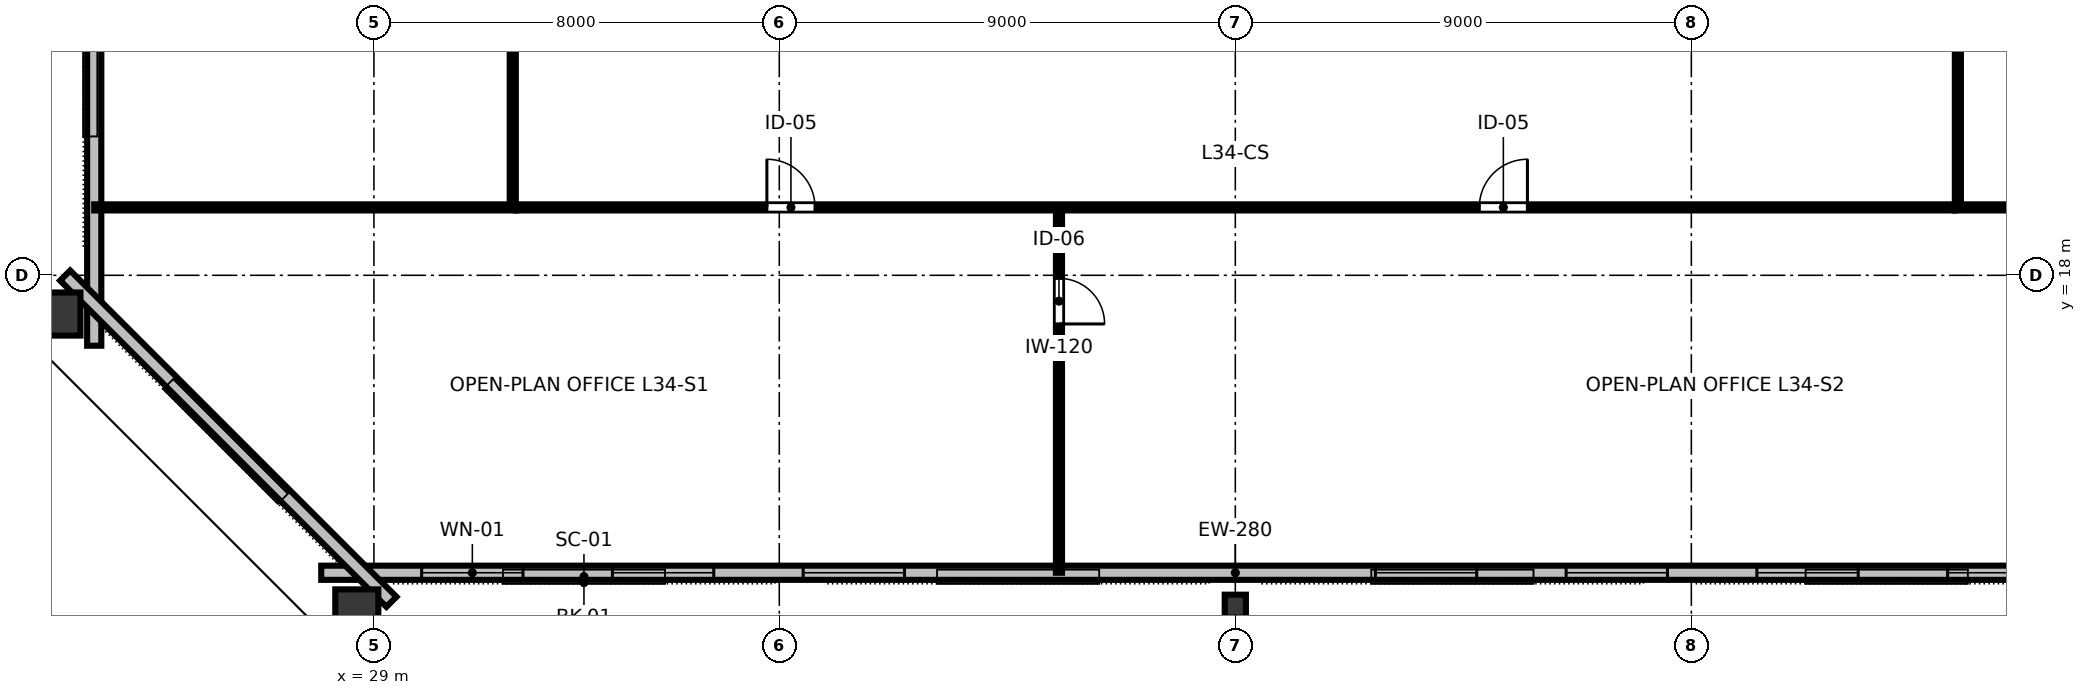
"""IFC4 building model, lengths in metres.
Left out: names, types, materials, properties, quantities, classifications, styles, units other than length and angle.
Written with IfcOpenShell. Run it as: python <this file> out.ifc"""

import sys

from ifc_helpers import new_model, si_unit, direction, frame, frame_2d, origin, origin_2d, place, context, subcontext, project, spatial, rectangle, hollow_rectangle, i_section, extrude, element, fill, save


model = new_model("IFC4")
c1 = context("Model", 3, precision=1e-05, world=origin(), true_north=direction((0.0, 1.0)))
c2 = subcontext(c1, "Body", "Model", "MODEL_VIEW")
j1 = project(units=[si_unit("LENGTHUNIT", "METRE"), si_unit("PLANEANGLEUNIT", "RADIAN")], contexts=[c1])
p1 = place(None, origin())
s1 = spatial("IfcSite", under=j1, at=p1, CompositionType="ELEMENT")
p2 = place(p1, origin())
s2 = spatial("IfcBuilding", under=s1, at=p2, CompositionType="ELEMENT")
p3 = place(p2, frame((0.0, 0.0, 131.2)))
s3 = spatial("IfcBuildingStorey", under=s2, at=p3, CompositionType="ELEMENT", Elevation=131.2)
p4 = place(p3, frame((28.662, 11.302, 0.0), z_axis=(0.0, 0.0, 1.0), x_axis=(1.0, 0.0, 0.0)))
e1 = element("IfcColumn", 1, at=p4, inside=s3, PredefinedType="COLUMN", context=c2, shape_type="SweptSolid", body=[
    extrude(hollow_rectangle(XDim=0.85, YDim=1.0, WallThickness=0.05, at=origin_2d()), origin(), (0.0, 0.0, 1.0), 3.358),
])
p5 = place(p3, frame((46.0, 11.47, 0.0), z_axis=(0.0, 0.0, 1.0), x_axis=(1.0, 0.0, 0.0)))
e2 = element("IfcColumn", 2, at=p5, inside=s3, PredefinedType="COLUMN", context=c2, shape_type="SweptSolid", body=[
    extrude(i_section(OverallWidth=0.418, OverallDepth=0.455, WebThickness=0.042, FlangeThickness=0.068, FilletRadius=0.025, at=origin_2d()), origin(), (0.0, 0.0, 1.0), 3.358),
])
p6 = place(p3, frame((22.708, 17.236, 0.0), z_axis=(0.0, 0.0, 1.0), x_axis=(0.0, 1.0, 0.0)))
e3 = element("IfcColumn", 3, at=p6, inside=s3, PredefinedType="COLUMN", context=c2, shape_type="SweptSolid", body=[
    extrude(hollow_rectangle(XDim=0.85, YDim=1.0, WallThickness=0.05, at=origin_2d()), origin(), (0.0, 0.0, 1.0), 3.358),
])
p7 = place(p3, frame((27.96, 12.13, 0.0), z_axis=(0.0, 0.0, 1.0), x_axis=(1.0, 0.0, 0.0)))
e4 = element("IfcWall", 4, at=p7, inside=s3, PredefinedType="STANDARD", context=c2, shape_type="SweptSolid", body=[
    extrude(rectangle(XDim=36.08, YDim=0.28, at=frame_2d((18.04, 0.0))), origin(), (0.0, 0.0, 1.0), 3.36),
])
p8 = place(p7, frame((1.982, 0.0, 0.8)))
e5 = element("IfcOpeningElement", 5, at=p8, cuts=e4, PredefinedType="OPENING", context=c2, shape_type="SweptSolid", body=[
    extrude(rectangle(XDim=2.0, YDim=1.95, at=frame_2d((1.0, 0.975))), frame((0.0, 0.15, 0.0), z_axis=(0.0, -1.0, 0.0), x_axis=(1.0, 0.0, 0.0)), (0.0, 0.0, 1.0), 0.3),
])
p9 = place(p7, frame((5.747, 0.0, 0.8)))
e6 = element("IfcOpeningElement", 6, at=p9, cuts=e4, PredefinedType="OPENING", context=c2, shape_type="SweptSolid", body=[
    extrude(rectangle(XDim=2.0, YDim=1.95, at=frame_2d((1.0, 0.975))), frame((0.0, 0.15, 0.0), z_axis=(0.0, -1.0, 0.0), x_axis=(1.0, 0.0, 0.0)), (0.0, 0.0, 1.0), 0.3),
])
p10 = place(p7, frame((9.511, 0.0, 0.8)))
e7 = element("IfcOpeningElement", 7, at=p10, cuts=e4, PredefinedType="OPENING", context=c2, shape_type="SweptSolid", body=[
    extrude(rectangle(XDim=2.0, YDim=1.95, at=frame_2d((1.0, 0.975))), frame((0.0, 0.15, 0.0), z_axis=(0.0, -1.0, 0.0), x_axis=(1.0, 0.0, 0.0)), (0.0, 0.0, 1.0), 0.3),
])
p11 = place(p7, frame((20.804, 0.0, 0.8)))
e8 = element("IfcOpeningElement", 8, at=p11, cuts=e4, PredefinedType="OPENING", context=c2, shape_type="SweptSolid", body=[
    extrude(rectangle(XDim=2.0, YDim=1.95, at=frame_2d((1.0, 0.975))), frame((0.0, 0.15, 0.0), z_axis=(0.0, -1.0, 0.0), x_axis=(1.0, 0.0, 0.0)), (0.0, 0.0, 1.0), 0.3),
])
p12 = place(p7, frame((24.569, 0.0, 0.8)))
e9 = element("IfcOpeningElement", 9, at=p12, cuts=e4, PredefinedType="OPENING", context=c2, shape_type="SweptSolid", body=[
    extrude(rectangle(XDim=2.0, YDim=1.95, at=frame_2d((1.0, 0.975))), frame((0.0, 0.15, 0.0), z_axis=(0.0, -1.0, 0.0), x_axis=(1.0, 0.0, 0.0)), (0.0, 0.0, 1.0), 0.3),
])
p13 = place(p7, frame((28.333, 0.0, 0.8)))
e10 = element("IfcOpeningElement", 10, at=p13, cuts=e4, PredefinedType="OPENING", context=c2, shape_type="SweptSolid", body=[
    extrude(rectangle(XDim=2.0, YDim=1.95, at=frame_2d((1.0, 0.975))), frame((0.0, 0.15, 0.0), z_axis=(0.0, -1.0, 0.0), x_axis=(1.0, 0.0, 0.0)), (0.0, 0.0, 1.0), 0.3),
])
p14 = place(p7, frame((32.098, 0.0, 0.8)))
e11 = element("IfcOpeningElement", 11, at=p14, cuts=e4, PredefinedType="OPENING", context=c2, shape_type="SweptSolid", body=[
    extrude(rectangle(XDim=2.0, YDim=1.95, at=frame_2d((1.0, 0.975))), frame((0.0, 0.15, 0.0), z_axis=(0.0, -1.0, 0.0), x_axis=(1.0, 0.0, 0.0)), (0.0, 0.0, 1.0), 0.3),
])
p15 = place(p3, frame((23.48, 47.39, 0.0), z_axis=(0.0, 0.0, 1.0), x_axis=(0.0, -1.0, 0.0)))
e12 = element("IfcWall", 12, at=p15, inside=s3, PredefinedType="STANDARD", context=c2, shape_type="SweptSolid", body=[
    extrude(rectangle(XDim=30.78, YDim=0.28, at=frame_2d((15.39, 0.0))), origin(), (0.0, 0.0, 1.0), 3.36),
])
p16 = place(p15, frame((6.224, 0.0, 0.8)))
e13 = element("IfcOpeningElement", 13, at=p16, cuts=e12, PredefinedType="OPENING", context=c2, shape_type="SweptSolid", body=[
    extrude(rectangle(XDim=2.0, YDim=1.95, at=frame_2d((1.0, 0.975))), frame((0.0, 0.15, 0.0), z_axis=(0.0, -1.0, 0.0), x_axis=(1.0, 0.0, 0.0)), (0.0, 0.0, 1.0), 0.3),
])
p17 = place(p15, frame((10.307, 0.0, 0.8)))
e14 = element("IfcOpeningElement", 14, at=p17, cuts=e12, PredefinedType="OPENING", context=c2, shape_type="SweptSolid", body=[
    extrude(rectangle(XDim=2.0, YDim=1.95, at=frame_2d((1.0, 0.975))), frame((0.0, 0.15, 0.0), z_axis=(0.0, -1.0, 0.0), x_axis=(1.0, 0.0, 0.0)), (0.0, 0.0, 1.0), 0.3),
])
p18 = place(p15, frame((18.473, 0.0, 0.8)))
e15 = element("IfcOpeningElement", 15, at=p18, cuts=e12, PredefinedType="OPENING", context=c2, shape_type="SweptSolid", body=[
    extrude(rectangle(XDim=2.0, YDim=1.95, at=frame_2d((1.0, 0.975))), frame((0.0, 0.15, 0.0), z_axis=(0.0, -1.0, 0.0), x_axis=(1.0, 0.0, 0.0)), (0.0, 0.0, 1.0), 0.3),
])
p19 = place(p15, frame((22.556, 0.0, 0.8)))
e16 = element("IfcOpeningElement", 16, at=p19, cuts=e12, PredefinedType="OPENING", context=c2, shape_type="SweptSolid", body=[
    extrude(rectangle(XDim=2.0, YDim=1.95, at=frame_2d((1.0, 0.975))), frame((0.0, 0.15, 0.0), z_axis=(0.0, -1.0, 0.0), x_axis=(1.0, 0.0, 0.0)), (0.0, 0.0, 1.0), 0.3),
])
p20 = place(p3, frame((22.906, 17.996, 0.0), z_axis=(0.0, 0.0, 1.0), x_axis=(0.707106781187, -0.707106781187, 0.0)))
e17 = element("IfcWall", 17, at=p20, inside=s3, PredefinedType="STANDARD", context=c2, shape_type="SweptSolid", body=[
    extrude(rectangle(XDim=9.107, YDim=0.28, at=frame_2d((4.553, 0.0))), origin(), (0.0, 0.0, 1.0), 3.36),
])
p21 = place(p3, frame((42.52, 19.34, 0.0), z_axis=(0.0, 0.0, 1.0), x_axis=(0.0, -1.0, 0.0)))
e18 = element("IfcWall", 18, at=p21, inside=s3, PredefinedType="PARTITIONING", context=c2, shape_type="SweptSolid", body=[
    extrude(rectangle(XDim=7.21, YDim=0.12, at=frame_2d((3.605, 0.0))), origin(), (0.0, 0.0, 1.0), 2.64),
])
p22 = place(p21, frame((1.4, 0.0, 0.0)))
e19 = element("IfcOpeningElement", 19, at=p22, cuts=e18, PredefinedType="OPENING", context=c2, shape_type="SweptSolid", body=[
    extrude(rectangle(XDim=0.9, YDim=2.15, at=frame_2d((0.45, 1.075))), frame((0.0, 0.07, 0.0), z_axis=(0.0, -1.0, 0.0), x_axis=(1.0, 0.0, 0.0)), (0.0, 0.0, 1.0), 0.14),
])
p23 = place(p3, frame((31.8, 19.34, 0.0), z_axis=(0.0, 0.0, 1.0), x_axis=(1.0, 0.0, 0.0)))
e20 = element("IfcWall", 20, at=p23, inside=s3, PredefinedType="PARTITIONING", context=c2, shape_type="SweptSolid", body=[
    extrude(rectangle(XDim=28.4, YDim=0.12, at=frame_2d((14.2, 0.0))), origin(), (0.0, 0.0, 1.0), 2.64),
])
p24 = place(p23, frame((4.955, 0.0, 0.0)))
e21 = element("IfcOpeningElement", 21, at=p24, cuts=e20, PredefinedType="OPENING", context=c2, shape_type="SweptSolid", body=[
    extrude(rectangle(XDim=0.95, YDim=2.15, at=frame_2d((0.475, 1.075))), frame((0.0, 0.07, 0.0), z_axis=(0.0, -1.0, 0.0), x_axis=(1.0, 0.0, 0.0)), (0.0, 0.0, 1.0), 0.14),
])
p25 = place(p23, frame((19.015, 0.0, 0.0)))
e22 = element("IfcOpeningElement", 22, at=p25, cuts=e20, PredefinedType="OPENING", context=c2, shape_type="SweptSolid", body=[
    extrude(rectangle(XDim=0.95, YDim=2.15, at=frame_2d((0.475, 1.075))), frame((0.0, 0.07, 0.0), z_axis=(0.0, -1.0, 0.0), x_axis=(1.0, 0.0, 0.0)), (0.0, 0.0, 1.0), 0.14),
])
p26 = place(p3, frame((31.74, 19.4, 0.0), z_axis=(0.0, 0.0, 1.0), x_axis=(0.0, 1.0, 0.0)))
e23 = element("IfcWall", 23, at=p26, inside=s3, PredefinedType="PARTITIONING", context=c2, shape_type="SweptSolid", body=[
    extrude(rectangle(XDim=11.58, YDim=0.12, at=frame_2d((5.79, 0.0))), origin(), (0.0, 0.0, 1.0), 2.64),
])
p27 = place(p26, frame((5.415, 0.0, 0.0)))
e24 = element("IfcOpeningElement", 24, at=p27, cuts=e23, PredefinedType="OPENING", context=c2, shape_type="SweptSolid", body=[
    extrude(rectangle(XDim=0.95, YDim=2.15, at=frame_2d((0.475, 1.075))), frame((0.0, 0.07, 0.0), z_axis=(0.0, -1.0, 0.0), x_axis=(1.0, 0.0, 0.0)), (0.0, 0.0, 1.0), 0.14),
])
p28 = place(p3, frame((60.26, 19.4, 0.0), z_axis=(0.0, 0.0, 1.0), x_axis=(0.0, 1.0, 0.0)))
e25 = element("IfcWall", 25, at=p28, inside=s3, PredefinedType="PARTITIONING", context=c2, shape_type="SweptSolid", body=[
    extrude(rectangle(XDim=11.58, YDim=0.12, at=frame_2d((5.79, 0.0))), origin(), (0.0, 0.0, 1.0), 2.64),
])
p29 = place(p28, frame((3.925, 0.0, 0.0)))
e26 = element("IfcOpeningElement", 26, at=p29, cuts=e25, PredefinedType="OPENING", context=c2, shape_type="SweptSolid", body=[
    extrude(rectangle(XDim=0.95, YDim=2.15, at=frame_2d((0.475, 1.075))), frame((0.0, 0.07, 0.0), z_axis=(0.0, -1.0, 0.0), x_axis=(1.0, 0.0, 0.0)), (0.0, 0.0, 1.0), 0.14),
])
p30 = place(p28, frame((9.615, 0.0, 0.0)))
e27 = element("IfcOpeningElement", 27, at=p30, cuts=e25, PredefinedType="OPENING", context=c2, shape_type="SweptSolid", body=[
    extrude(rectangle(XDim=0.95, YDim=2.15, at=frame_2d((0.475, 1.075))), frame((0.0, 0.07, 0.0), z_axis=(0.0, -1.0, 0.0), x_axis=(1.0, 0.0, 0.0)), (0.0, 0.0, 1.0), 0.14),
])
for number, where, z_axis, x_axis in (
    (28, (31.8, 19.34, 0.0), (0.0, 0.0, 1.0), (-1.0, 0.0, 0.0)),
    (29, (60.2, 19.34, 0.0), (0.0, 0.0, 1.0), (1.0, 0.0, 0.0)),
):
    element("IfcWall", number, at=place(p3, frame(where, z_axis=z_axis, x_axis=x_axis)), inside=s3, PredefinedType="PARTITIONING", context=c2, shape_type="SweptSolid", body=[
        extrude(rectangle(XDim=8.32, YDim=0.12, at=frame_2d((4.16, 0.0))), origin(), (0.0, 0.0, 1.0), 2.64),
    ])
p31 = place(p8, origin())
e30 = element("IfcWindow", 30, at=p31, inside=s3, PartitioningType="SINGLE_PANEL", PredefinedType="WINDOW", context=c2, shape_type="SweptSolid", body=[
    extrude(rectangle(XDim=2.0, YDim=1.95, at=frame_2d((1.0, 0.975))), frame((0.0, 0.03, 0.0), z_axis=(0.0, -1.0, 0.0), x_axis=(1.0, 0.0, 0.0)), (0.0, 0.0, 1.0), 0.06),
])
fill(e5, e30)
p32 = place(p9, origin())
e31 = element("IfcWindow", 31, at=p32, inside=s3, PartitioningType="SINGLE_PANEL", PredefinedType="WINDOW", context=c2, shape_type="SweptSolid", body=[
    extrude(rectangle(XDim=2.0, YDim=1.95, at=frame_2d((1.0, 0.975))), frame((0.0, 0.03, 0.0), z_axis=(0.0, -1.0, 0.0), x_axis=(1.0, 0.0, 0.0)), (0.0, 0.0, 1.0), 0.06),
])
fill(e6, e31)
p33 = place(p10, origin())
e32 = element("IfcWindow", 32, at=p33, inside=s3, PartitioningType="SINGLE_PANEL", PredefinedType="WINDOW", context=c2, shape_type="SweptSolid", body=[
    extrude(rectangle(XDim=2.0, YDim=1.95, at=frame_2d((1.0, 0.975))), frame((0.0, 0.03, 0.0), z_axis=(0.0, -1.0, 0.0), x_axis=(1.0, 0.0, 0.0)), (0.0, 0.0, 1.0), 0.06),
])
fill(e7, e32)
p34 = place(p11, origin())
e33 = element("IfcWindow", 33, at=p34, inside=s3, PartitioningType="SINGLE_PANEL", PredefinedType="WINDOW", context=c2, shape_type="SweptSolid", body=[
    extrude(rectangle(XDim=2.0, YDim=1.95, at=frame_2d((1.0, 0.975))), frame((0.0, 0.03, 0.0), z_axis=(0.0, -1.0, 0.0), x_axis=(1.0, 0.0, 0.0)), (0.0, 0.0, 1.0), 0.06),
])
fill(e8, e33)
p35 = place(p12, origin())
e34 = element("IfcWindow", 34, at=p35, inside=s3, PartitioningType="SINGLE_PANEL", PredefinedType="WINDOW", context=c2, shape_type="SweptSolid", body=[
    extrude(rectangle(XDim=2.0, YDim=1.95, at=frame_2d((1.0, 0.975))), frame((0.0, 0.03, 0.0), z_axis=(0.0, -1.0, 0.0), x_axis=(1.0, 0.0, 0.0)), (0.0, 0.0, 1.0), 0.06),
])
fill(e9, e34)
p36 = place(p13, origin())
e35 = element("IfcWindow", 35, at=p36, inside=s3, PartitioningType="SINGLE_PANEL", PredefinedType="WINDOW", context=c2, shape_type="SweptSolid", body=[
    extrude(rectangle(XDim=2.0, YDim=1.95, at=frame_2d((1.0, 0.975))), frame((0.0, 0.03, 0.0), z_axis=(0.0, -1.0, 0.0), x_axis=(1.0, 0.0, 0.0)), (0.0, 0.0, 1.0), 0.06),
])
fill(e10, e35)
p37 = place(p14, origin())
e36 = element("IfcWindow", 36, at=p37, inside=s3, PartitioningType="SINGLE_PANEL", PredefinedType="WINDOW", context=c2, shape_type="SweptSolid", body=[
    extrude(rectangle(XDim=2.0, YDim=1.95, at=frame_2d((1.0, 0.975))), frame((0.0, 0.03, 0.0), z_axis=(0.0, -1.0, 0.0), x_axis=(1.0, 0.0, 0.0)), (0.0, 0.0, 1.0), 0.06),
])
fill(e11, e36)
p38 = place(p22, origin())
e37 = element("IfcDoor", 37, at=p38, inside=s3, OperationType="SINGLE_SWING_RIGHT", PredefinedType="DOOR", context=c2, shape_type="SweptSolid", body=[
    extrude(rectangle(XDim=0.9, YDim=2.15, at=frame_2d((0.45, 1.075))), frame((0.0, 0.025, 0.0), z_axis=(0.0, -1.0, 0.0), x_axis=(1.0, 0.0, 0.0)), (0.0, 0.0, 1.0), 0.05),
])
fill(e19, e37)
p39 = place(p24, origin())
e38 = element("IfcDoor", 38, at=p39, inside=s3, OperationType="SINGLE_SWING_LEFT", PredefinedType="DOOR", context=c2, shape_type="SweptSolid", body=[
    extrude(rectangle(XDim=0.95, YDim=2.15, at=frame_2d((0.475, 1.075))), frame((0.0, 0.025, 0.0), z_axis=(0.0, -1.0, 0.0), x_axis=(1.0, 0.0, 0.0)), (0.0, 0.0, 1.0), 0.05),
])
fill(e21, e38)
p40 = place(p25, origin())
e39 = element("IfcDoor", 39, at=p40, inside=s3, OperationType="SINGLE_SWING_RIGHT", PredefinedType="DOOR", context=c2, shape_type="SweptSolid", body=[
    extrude(rectangle(XDim=0.95, YDim=2.15, at=frame_2d((0.475, 1.075))), frame((0.0, 0.025, 0.0), z_axis=(0.0, -1.0, 0.0), x_axis=(1.0, 0.0, 0.0)), (0.0, 0.0, 1.0), 0.05),
])
fill(e22, e39)
save(model, sys.argv[1])
